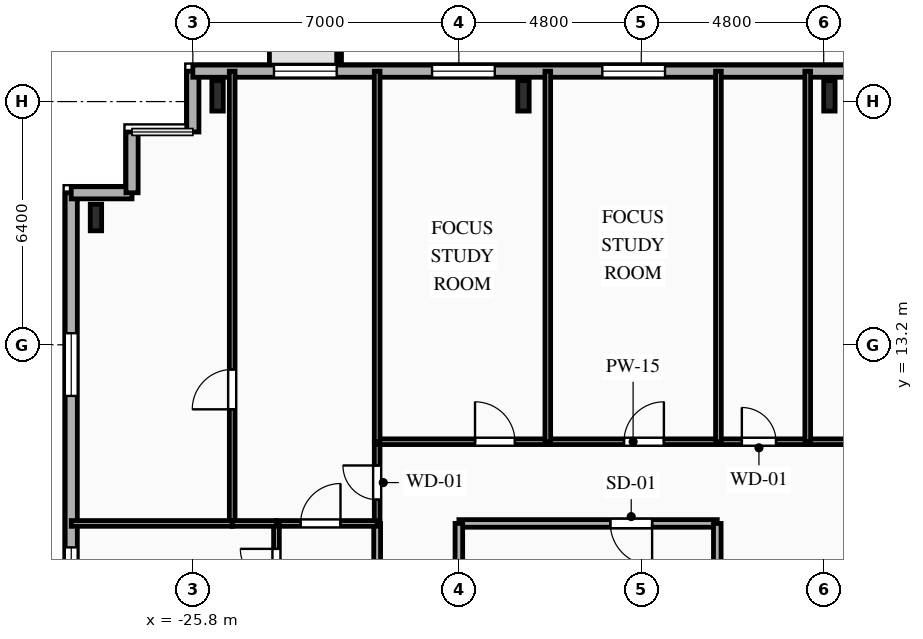
"""IFC4 building model, lengths in metres.
Left out: names, types, materials, properties, quantities, classifications, styles, units other than length and angle.
Written with IfcOpenShell. Run it as: python <this file> out.ifc"""

import sys

from ifc_helpers import new_model, si_unit, direction, frame, frame_2d, origin, origin_2d, place, context, subcontext, project, spatial, rectangle, i_section, extrude, element, fill, save


model = new_model("IFC4")
c1 = context("Model", 3, precision=1e-05, world=origin(), true_north=direction((0.0, 1.0)))
c2 = subcontext(c1, "Body", "Model", "MODEL_VIEW")
j1 = project(units=[si_unit("LENGTHUNIT", "METRE"), si_unit("PLANEANGLEUNIT", "RADIAN")], contexts=[c1])
p1 = place(None, origin())
s1 = spatial("IfcSite", under=j1, at=p1, CompositionType="ELEMENT")
p2 = place(p1, origin())
s2 = spatial("IfcBuilding", under=s1, at=p2, CompositionType="ELEMENT")
p3 = place(p2, frame((0.0, 0.0, 164.5)))
s3 = spatial("IfcBuildingStorey", under=s2, at=p3, CompositionType="ELEMENT", Elevation=164.5)
for number, where, z_axis, x_axis in (
    (1, (-9.05, 19.75, 0.0), (0.0, 0.0, 1.0), (1.0, 0.0, 0.0)),
    (2, (-17.1, 19.75, 0.0), (0.0, 0.0, 1.0), (1.0, 0.0, 0.0)),
    (3, (-25.15, 19.75, 0.0), (0.0, 0.0, 1.0), (1.0, 0.0, 0.0)),
):
    element("IfcColumn", number, at=place(p3, frame(where, z_axis=z_axis, x_axis=x_axis)), inside=s3, PredefinedType="COLUMN", context=c2, shape_type="SweptSolid", body=[
        extrude(i_section(OverallWidth=0.3, OverallDepth=0.8, WebThickness=0.018, FlangeThickness=0.033, FilletRadius=0.03, at=origin_2d()), origin(), (0.0, 0.0, 1.0), 3.35),
    ])
p4 = place(p3, frame((-28.35, 16.55, 0.0), z_axis=(0.0, 0.0, 1.0), x_axis=(1.0, 0.0, 0.0)))
e4 = element("IfcColumn", 4, at=p4, inside=s3, PredefinedType="COLUMN", context=c2, shape_type="SweptSolid", body=[
    extrude(i_section(OverallWidth=0.3, OverallDepth=0.7, WebThickness=0.017, FlangeThickness=0.032, FilletRadius=0.027, at=origin_2d()), origin(), (0.0, 0.0, 1.0), 3.35),
])
p5 = place(p3, frame((-29.0, -12.4, 0.0), z_axis=(0.0, 0.0, 1.0), x_axis=(0.0, 1.0, 0.0)))
e5 = element("IfcWall", 5, at=p5, inside=s3, PredefinedType="SOLIDWALL", context=c2, shape_type="SweptSolid", body=[
    extrude(rectangle(XDim=29.6, YDim=0.32, at=frame_2d((14.8, 0.0))), origin(), (0.0, 0.0, 1.0), 3.04),
])
p6 = place(p5, frame((2.855, 0.0, 0.85)))
e6 = element("IfcOpeningElement", 6, at=p6, cuts=e5, PredefinedType="OPENING", context=c2, shape_type="SweptSolid", body=[
    extrude(rectangle(XDim=1.65, YDim=1.85, at=frame_2d((0.825, 0.925))), frame((0.0, 0.17, 0.0), z_axis=(0.0, -1.0, 0.0), x_axis=(1.0, 0.0, 0.0)), (0.0, 0.0, 1.0), 0.34),
])
p7 = place(p5, frame((9.865, 0.0, 0.85)))
e7 = element("IfcOpeningElement", 7, at=p7, cuts=e5, PredefinedType="OPENING", context=c2, shape_type="SweptSolid", body=[
    extrude(rectangle(XDim=1.95, YDim=1.85, at=frame_2d((0.975, 0.925))), frame((0.0, 0.17, 0.0), z_axis=(0.0, -1.0, 0.0), x_axis=(1.0, 0.0, 0.0)), (0.0, 0.0, 1.0), 0.34),
])
p8 = place(p5, frame((13.13, 0.0, 0.85)))
e8 = element("IfcOpeningElement", 8, at=p8, cuts=e5, PredefinedType="OPENING", context=c2, shape_type="SweptSolid", body=[
    extrude(rectangle(XDim=1.5, YDim=1.85, at=frame_2d((0.75, 0.925))), frame((0.0, 0.17, 0.0), z_axis=(0.0, -1.0, 0.0), x_axis=(1.0, 0.0, 0.0)), (0.0, 0.0, 1.0), 0.34),
])
p9 = place(p5, frame((15.93, 0.0, 0.85)))
e9 = element("IfcOpeningElement", 9, at=p9, cuts=e5, PredefinedType="OPENING", context=c2, shape_type="SweptSolid", body=[
    extrude(rectangle(XDim=1.5, YDim=1.85, at=frame_2d((0.75, 0.925))), frame((0.0, 0.17, 0.0), z_axis=(0.0, -1.0, 0.0), x_axis=(1.0, 0.0, 0.0)), (0.0, 0.0, 1.0), 0.34),
])
p10 = place(p5, frame((18.77, 0.0, 0.85)))
e10 = element("IfcOpeningElement", 10, at=p10, cuts=e5, PredefinedType="OPENING", context=c2, shape_type="SweptSolid", body=[
    extrude(rectangle(XDim=1.5, YDim=1.85, at=frame_2d((0.75, 0.925))), frame((0.0, 0.17, 0.0), z_axis=(0.0, -1.0, 0.0), x_axis=(1.0, 0.0, 0.0)), (0.0, 0.0, 1.0), 0.34),
])
p11 = place(p5, frame((24.255, 0.0, 0.85)))
e11 = element("IfcOpeningElement", 11, at=p11, cuts=e5, PredefinedType="OPENING", context=c2, shape_type="SweptSolid", body=[
    extrude(rectangle(XDim=1.65, YDim=1.85, at=frame_2d((0.825, 0.925))), frame((0.0, 0.17, 0.0), z_axis=(0.0, -1.0, 0.0), x_axis=(1.0, 0.0, 0.0)), (0.0, 0.0, 1.0), 0.34),
])
for number, where, z_axis, x_axis in (
    (12, (-29.0, 17.2, 0.0), (0.0, 0.0, 1.0), (1.0, 0.0, 0.0)),
    (13, (-27.4, 17.2, 0.0), (0.0, 0.0, 1.0), (0.0, 1.0, 0.0)),
):
    element("IfcWall", number, at=place(p3, frame(where, z_axis=z_axis, x_axis=x_axis)), inside=s3, PredefinedType="SOLIDWALL", context=c2, shape_type="SweptSolid", body=[
        extrude(rectangle(XDim=1.6, YDim=0.32, at=frame_2d((0.8, 0.0))), origin(), (0.0, 0.0, 1.0), 3.04),
    ])
p12 = place(p3, frame((-25.8, 18.8, 0.0), z_axis=(0.0, 0.0, 1.0), x_axis=(0.0, 1.0, 0.0)))
e14 = element("IfcWall", 14, at=p12, inside=s3, PredefinedType="SOLIDWALL", context=c2, shape_type="SweptSolid", body=[
    extrude(rectangle(XDim=1.6, YDim=0.32, at=frame_2d((0.8, 0.0))), origin(), (0.0, 0.0, 1.0), 3.04),
])
p13 = place(p3, frame((-25.8, 20.4, 0.0), z_axis=(0.0, 0.0, 1.0), x_axis=(1.0, 0.0, 0.0)))
e15 = element("IfcWall", 15, at=p13, inside=s3, PredefinedType="SOLIDWALL", context=c2, shape_type="SweptSolid", body=[
    extrude(rectangle(XDim=49.6, YDim=0.32, at=frame_2d((24.8, 0.0))), origin(), (0.0, 0.0, 1.0), 3.04),
])
p14 = place(p13, frame((2.135, 0.0, 0.85)))
e16 = element("IfcOpeningElement", 16, at=p14, cuts=e15, PredefinedType="OPENING", context=c2, shape_type="SweptSolid", body=[
    extrude(rectangle(XDim=1.65, YDim=1.85, at=frame_2d((0.825, 0.925))), frame((0.0, 0.17, 0.0), z_axis=(0.0, -1.0, 0.0), x_axis=(1.0, 0.0, 0.0)), (0.0, 0.0, 1.0), 0.34),
])
p15 = place(p13, frame((6.295, 0.0, 0.85)))
e17 = element("IfcOpeningElement", 17, at=p15, cuts=e15, PredefinedType="OPENING", context=c2, shape_type="SweptSolid", body=[
    extrude(rectangle(XDim=1.65, YDim=1.85, at=frame_2d((0.825, 0.925))), frame((0.0, 0.17, 0.0), z_axis=(0.0, -1.0, 0.0), x_axis=(1.0, 0.0, 0.0)), (0.0, 0.0, 1.0), 0.34),
])
p16 = place(p13, frame((10.775, 0.0, 0.85)))
e18 = element("IfcOpeningElement", 18, at=p16, cuts=e15, PredefinedType="OPENING", context=c2, shape_type="SweptSolid", body=[
    extrude(rectangle(XDim=1.65, YDim=1.85, at=frame_2d((0.825, 0.925))), frame((0.0, 0.17, 0.0), z_axis=(0.0, -1.0, 0.0), x_axis=(1.0, 0.0, 0.0)), (0.0, 0.0, 1.0), 0.34),
])
p17 = place(p13, frame((18.49, 0.0, 0.85)))
e19 = element("IfcOpeningElement", 19, at=p17, cuts=e15, PredefinedType="OPENING", context=c2, shape_type="SweptSolid", body=[
    extrude(rectangle(XDim=1.5, YDim=1.85, at=frame_2d((0.75, 0.925))), frame((0.0, 0.17, 0.0), z_axis=(0.0, -1.0, 0.0), x_axis=(1.0, 0.0, 0.0)), (0.0, 0.0, 1.0), 0.34),
])
p18 = place(p13, frame((25.34, 0.0, 0.85)))
e20 = element("IfcOpeningElement", 20, at=p18, cuts=e15, PredefinedType="OPENING", context=c2, shape_type="SweptSolid", body=[
    extrude(rectangle(XDim=2.2, YDim=1.85, at=frame_2d((1.1, 0.925))), frame((0.0, 0.17, 0.0), z_axis=(0.0, -1.0, 0.0), x_axis=(1.0, 0.0, 0.0)), (0.0, 0.0, 1.0), 0.34),
])
p19 = place(p13, frame((33.74, 0.0, 0.85)))
e21 = element("IfcOpeningElement", 21, at=p19, cuts=e15, PredefinedType="OPENING", context=c2, shape_type="SweptSolid", body=[
    extrude(rectangle(XDim=2.2, YDim=1.85, at=frame_2d((1.1, 0.925))), frame((0.0, 0.17, 0.0), z_axis=(0.0, -1.0, 0.0), x_axis=(1.0, 0.0, 0.0)), (0.0, 0.0, 1.0), 0.34),
])
p20 = place(p13, frame((42.095, 0.0, 0.85)))
e22 = element("IfcOpeningElement", 22, at=p20, cuts=e15, PredefinedType="OPENING", context=c2, shape_type="SweptSolid", body=[
    extrude(rectangle(XDim=1.65, YDim=1.85, at=frame_2d((0.825, 0.925))), frame((0.0, 0.17, 0.0), z_axis=(0.0, -1.0, 0.0), x_axis=(1.0, 0.0, 0.0)), (0.0, 0.0, 1.0), 0.34),
])
p21 = place(p13, frame((47.45, 0.0, 0.85)))
e23 = element("IfcOpeningElement", 23, at=p21, cuts=e15, PredefinedType="OPENING", context=c2, shape_type="SweptSolid", body=[
    extrude(rectangle(XDim=1.1, YDim=1.85, at=frame_2d((0.55, 0.925))), frame((0.0, 0.17, 0.0), z_axis=(0.0, -1.0, 0.0), x_axis=(1.0, 0.0, 0.0)), (0.0, 0.0, 1.0), 0.34),
])
p22 = place(p3, frame((-12.0, 8.5, 0.0), z_axis=(0.0, 0.0, 1.0), x_axis=(-1.0, 0.0, 0.0)))
e24 = element("IfcWall", 24, at=p22, inside=s3, PredefinedType="PARTITIONING", context=c2, shape_type="SweptSolid", body=[
    extrude(rectangle(XDim=6.8, YDim=0.2, at=frame_2d((3.4, 0.0))), origin(), (0.0, 0.0, 1.0), 3.04),
])
p23 = place(p22, frame((1.715, 0.0, 0.0)))
e25 = element("IfcOpeningElement", 25, at=p23, cuts=e24, PredefinedType="OPENING", context=c2, shape_type="SweptSolid", body=[
    extrude(rectangle(XDim=1.1, YDim=2.15, at=frame_2d((0.55, 1.075))), frame((0.0, 0.11, 0.0), z_axis=(0.0, -1.0, 0.0), x_axis=(1.0, 0.0, 0.0)), (0.0, 0.0, 1.0), 0.22),
])
p24 = place(p3, frame((-18.8, 8.5, 0.0), z_axis=(0.0, 0.0, 1.0), x_axis=(0.0, -1.0, 0.0)))
e26 = element("IfcWall", 26, at=p24, inside=s3, PredefinedType="PARTITIONING", context=c2, shape_type="SweptSolid", body=[
    extrude(rectangle(XDim=2.9, YDim=0.2, at=frame_2d((1.45, 0.0))), origin(), (0.0, 0.0, 1.0), 2.525),
])
p25 = place(p3, frame((-12.0, 5.6, 0.0), z_axis=(0.0, 0.0, 1.0), x_axis=(0.0, 1.0, 0.0)))
e27 = element("IfcWall", 27, at=p25, inside=s3, PredefinedType="PARTITIONING", context=c2, shape_type="SweptSolid", body=[
    extrude(rectangle(XDim=2.9, YDim=0.2, at=frame_2d((1.45, 0.0))), origin(), (0.0, 0.0, 1.0), 3.04),
])
p26 = place(p3, frame((-20.95, 8.5, 0.0), z_axis=(0.0, 0.0, 1.0), x_axis=(0.0, 1.0, 0.0)))
e28 = element("IfcWall", 28, at=p26, inside=s3, PredefinedType="PARTITIONING", context=c2, shape_type="SweptSolid", body=[
    extrude(rectangle(XDim=2.15, YDim=0.15, at=frame_2d((1.075, 0.0))), origin(), (0.0, 0.0, 1.0), 3.04),
])
p27 = place(p26, frame((0.625, 0.0, 0.0)))
e29 = element("IfcOpeningElement", 29, at=p27, cuts=e28, PredefinedType="OPENING", context=c2, shape_type="SweptSolid", body=[
    extrude(rectangle(XDim=0.9, YDim=2.1, at=frame_2d((0.45, 1.05))), frame((0.0, 0.085, 0.0), z_axis=(0.0, -1.0, 0.0), x_axis=(1.0, 0.0, 0.0)), (0.0, 0.0, 1.0), 0.17),
])
p28 = place(p3, frame((-20.95, 10.65, 0.0), z_axis=(0.0, 0.0, 1.0), x_axis=(1.0, 0.0, 0.0)))
e30 = element("IfcWall", 30, at=p28, inside=s3, PredefinedType="PARTITIONING", context=c2, shape_type="SweptSolid", body=[
    extrude(rectangle(XDim=4.49, YDim=0.15, at=frame_2d((2.245, 0.0))), origin(), (0.0, 0.0, 1.0), 3.04),
])
p29 = place(p28, frame((2.575, 0.0, 0.0)))
e31 = element("IfcOpeningElement", 31, at=p29, cuts=e30, PredefinedType="OPENING", context=c2, shape_type="SweptSolid", body=[
    extrude(rectangle(XDim=1.05, YDim=2.15, at=frame_2d((0.525, 1.075))), frame((0.0, 0.085, 0.0), z_axis=(0.0, -1.0, 0.0), x_axis=(1.0, 0.0, 0.0)), (0.0, 0.0, 1.0), 0.17),
])
p30 = place(p3, frame((-16.46, 10.65, 0.0), z_axis=(0.0, 0.0, 1.0), x_axis=(1.0, 0.0, 0.0)))
e32 = element("IfcWall", 32, at=p30, inside=s3, PredefinedType="PARTITIONING", context=c2, shape_type="SweptSolid", body=[
    extrude(rectangle(XDim=4.49, YDim=0.15, at=frame_2d((2.245, 0.0))), origin(), (0.0, 0.0, 1.0), 3.04),
])
p31 = place(p30, frame((2.005, 0.0, 0.0)))
e33 = element("IfcOpeningElement", 33, at=p31, cuts=e32, PredefinedType="OPENING", context=c2, shape_type="SweptSolid", body=[
    extrude(rectangle(XDim=1.05, YDim=2.15, at=frame_2d((0.525, 1.075))), frame((0.0, 0.085, 0.0), z_axis=(0.0, -1.0, 0.0), x_axis=(1.0, 0.0, 0.0)), (0.0, 0.0, 1.0), 0.17),
])
p32 = place(p3, frame((-11.97, 10.65, 0.0), z_axis=(0.0, 0.0, 1.0), x_axis=(1.0, 0.0, 0.0)))
e34 = element("IfcWall", 34, at=p32, inside=s3, PredefinedType="PLUMBINGWALL", context=c2, shape_type="SweptSolid", body=[
    extrude(rectangle(XDim=2.35, YDim=0.15, at=frame_2d((1.175, 0.0))), origin(), (0.0, 0.0, 1.0), 3.04),
])
p33 = place(p32, frame((0.616, 0.0, 0.0)))
e35 = element("IfcOpeningElement", 35, at=p33, cuts=e34, PredefinedType="OPENING", context=c2, shape_type="SweptSolid", body=[
    extrude(rectangle(XDim=0.9, YDim=2.1, at=frame_2d((0.45, 1.05))), frame((0.0, 0.085, 0.0), z_axis=(0.0, -1.0, 0.0), x_axis=(1.0, 0.0, 0.0)), (0.0, 0.0, 1.0), 0.17),
])
p34 = place(p3, frame((-9.62, 10.65, 0.0), z_axis=(0.0, 0.0, 1.0), x_axis=(1.0, 0.0, 0.0)))
e36 = element("IfcWall", 36, at=p34, inside=s3, PredefinedType="PARTITIONING", context=c2, shape_type="SweptSolid", body=[
    extrude(rectangle(XDim=6.03, YDim=0.15, at=frame_2d((3.015, 0.0))), origin(), (0.0, 0.0, 1.0), 3.04),
])
p35 = place(p34, frame((4.01, 0.0, 0.0)))
e37 = element("IfcOpeningElement", 37, at=p35, cuts=e36, PredefinedType="OPENING", context=c2, shape_type="SweptSolid", body=[
    extrude(rectangle(XDim=0.95, YDim=2.1, at=frame_2d((0.475, 1.05))), frame((0.0, 0.085, 0.0), z_axis=(0.0, -1.0, 0.0), x_axis=(1.0, 0.0, 0.0)), (0.0, 0.0, 1.0), 0.17),
])
p36 = place(p3, frame((-20.95, -5.6, 0.0), z_axis=(0.0, 0.0, 1.0), x_axis=(0.0, 1.0, 0.0)))
e38 = element("IfcWall", 38, at=p36, inside=s3, PredefinedType="PARTITIONING", context=c2, shape_type="SweptSolid", body=[
    extrude(rectangle(XDim=14.1, YDim=0.18, at=frame_2d((7.05, 0.0))), origin(), (0.0, 0.0, 1.0), 3.04),
])
p37 = place(p36, frame((5.058, 0.0, 0.0)))
e39 = element("IfcOpeningElement", 39, at=p37, cuts=e38, PredefinedType="OPENING", context=c2, shape_type="SweptSolid", body=[
    extrude(rectangle(XDim=1.0, YDim=2.15, at=frame_2d((0.5, 1.075))), frame((0.0, 0.1, 0.0), z_axis=(0.0, -1.0, 0.0), x_axis=(1.0, 0.0, 0.0)), (0.0, 0.0, 1.0), 0.2),
])
p38 = place(p3, frame((-23.6, 8.5, 0.0), z_axis=(0.0, 0.0, 1.0), x_axis=(1.0, 0.0, 0.0)))
e40 = element("IfcWall", 40, at=p38, inside=s3, PredefinedType="PARTITIONING", context=c2, shape_type="SweptSolid", body=[
    extrude(rectangle(XDim=2.65, YDim=0.15, at=frame_2d((1.325, 0.0))), origin(), (0.0, 0.0, 1.0), 3.04),
])
p39 = place(p38, frame((0.635, 0.0, 0.0)))
e41 = element("IfcOpeningElement", 41, at=p39, cuts=e40, PredefinedType="OPENING", context=c2, shape_type="SweptSolid", body=[
    extrude(rectangle(XDim=1.05, YDim=2.15, at=frame_2d((0.525, 1.075))), frame((0.0, 0.085, 0.0), z_axis=(0.0, -1.0, 0.0), x_axis=(1.0, 0.0, 0.0)), (0.0, 0.0, 1.0), 0.17),
])
p40 = place(p3, frame((-23.6, 5.68, 0.0), z_axis=(0.0, 0.0, 1.0), x_axis=(0.0, 1.0, 0.0)))
e42 = element("IfcWall", 42, at=p40, inside=s3, PredefinedType="PARTITIONING", context=c2, shape_type="SweptSolid", body=[
    extrude(rectangle(XDim=2.82, YDim=0.15, at=frame_2d((1.41, 0.0))), origin(), (0.0, 0.0, 1.0), 2.695),
])
p41 = place(p40, frame((1.201, 0.0, 0.0)))
e43 = element("IfcOpeningElement", 43, at=p41, cuts=e42, PredefinedType="OPENING", context=c2, shape_type="SweptSolid", body=[
    extrude(rectangle(XDim=0.95, YDim=2.1, at=frame_2d((0.475, 1.05))), frame((0.0, 0.085, 0.0), z_axis=(0.0, -1.0, 0.0), x_axis=(1.0, 0.0, 0.0)), (0.0, 0.0, 1.0), 0.17),
])
p42 = place(p3, frame((-24.765, 8.5, 0.0), z_axis=(0.0, 0.0, 1.0), x_axis=(0.0, 1.0, 0.0)))
e44 = element("IfcWall", 44, at=p42, inside=s3, PredefinedType="PARTITIONING", context=c2, shape_type="SweptSolid", body=[
    extrude(rectangle(XDim=11.9, YDim=0.15, at=frame_2d((5.95, 0.0))), origin(), (0.0, 0.0, 1.0), 3.04),
])
p43 = place(p42, frame((3.002, 0.0, 0.0)))
e45 = element("IfcOpeningElement", 45, at=p43, cuts=e44, PredefinedType="OPENING", context=c2, shape_type="SweptSolid", body=[
    extrude(rectangle(XDim=1.05, YDim=2.15, at=frame_2d((0.525, 1.075))), frame((0.0, 0.085, 0.0), z_axis=(0.0, -1.0, 0.0), x_axis=(1.0, 0.0, 0.0)), (0.0, 0.0, 1.0), 0.17),
])
p44 = place(p3, frame((-23.6, 8.5, 0.0), z_axis=(0.0, 0.0, 1.0), x_axis=(-1.0, 0.0, 0.0)))
e46 = element("IfcWall", 46, at=p44, inside=s3, PredefinedType="PARTITIONING", context=c2, shape_type="SweptSolid", body=[
    extrude(rectangle(XDim=1.165, YDim=0.15, at=frame_2d((0.583, 0.0))), origin(), (0.0, 0.0, 1.0), 3.04),
])
p45 = place(p3, frame((-20.95, 20.4, 0.0), z_axis=(0.0, 0.0, 1.0), x_axis=(0.0, -1.0, 0.0)))
e47 = element("IfcWall", 47, at=p45, inside=s3, PredefinedType="PARTITIONING", context=c2, shape_type="SweptSolid", body=[
    extrude(rectangle(XDim=9.75, YDim=0.15, at=frame_2d((4.875, 0.0))), origin(), (0.0, 0.0, 1.0), 3.04),
])
p46 = place(p3, frame((-24.765, 8.5, 0.0), z_axis=(0.0, 0.0, 1.0), x_axis=(-1.0, 0.0, 0.0)))
e48 = element("IfcWall", 48, at=p46, inside=s3, PredefinedType="PARTITIONING", context=c2, shape_type="SweptSolid", body=[
    extrude(rectangle(XDim=4.235, YDim=0.15, at=frame_2d((2.118, 0.0))), origin(), (0.0, 0.0, 1.0), 3.04),
])
p47 = place(p3, frame((-16.46, 20.4, 0.0), z_axis=(0.0, 0.0, 1.0), x_axis=(0.0, -1.0, 0.0)))
e49 = element("IfcWall", 49, at=p47, inside=s3, PredefinedType="PARTITIONING", context=c2, shape_type="SweptSolid", body=[
    extrude(rectangle(XDim=9.75, YDim=0.15, at=frame_2d((4.875, 0.0))), origin(), (0.0, 0.0, 1.0), 3.04),
])
for number, where, z_axis, x_axis in (
    (50, (-11.97, 20.4, 0.0), (0.0, 0.0, 1.0), (0.0, -1.0, 0.0)),
    (51, (-9.62, 20.4, 0.0), (0.0, 0.0, 1.0), (0.0, -1.0, 0.0)),
):
    element("IfcWall", number, at=place(p3, frame(where, z_axis=z_axis, x_axis=x_axis)), inside=s3, PredefinedType="PLUMBINGWALL", context=c2, shape_type="SweptSolid", body=[
        extrude(rectangle(XDim=9.75, YDim=0.15, at=frame_2d((4.875, 0.0))), origin(), (0.0, 0.0, 1.0), 3.04),
    ])
p48 = place(p10, origin())
e52 = element("IfcWindow", 52, at=p48, inside=s3, PartitioningType="SINGLE_PANEL", PredefinedType="WINDOW", context=c2, shape_type="SweptSolid", body=[
    extrude(rectangle(XDim=1.5, YDim=1.85, at=frame_2d((0.75, 0.925))), frame((0.0, 0.03, 0.0), z_axis=(0.0, -1.0, 0.0), x_axis=(1.0, 0.0, 0.0)), (0.0, 0.0, 1.0), 0.06),
])
fill(e10, e52)
p49 = place(p11, origin())
e53 = element("IfcWindow", 53, at=p49, inside=s3, PartitioningType="SINGLE_PANEL", PredefinedType="WINDOW", context=c2, shape_type="SweptSolid", body=[
    extrude(rectangle(XDim=1.65, YDim=1.85, at=frame_2d((0.825, 0.925))), frame((0.0, 0.03, 0.0), z_axis=(0.0, -1.0, 0.0), x_axis=(1.0, 0.0, 0.0)), (0.0, 0.0, 1.0), 0.06),
])
fill(e11, e53)
p50 = place(p14, origin())
e54 = element("IfcWindow", 54, at=p50, inside=s3, PartitioningType="SINGLE_PANEL", PredefinedType="WINDOW", context=c2, shape_type="SweptSolid", body=[
    extrude(rectangle(XDim=1.65, YDim=1.85, at=frame_2d((0.825, 0.925))), frame((0.0, 0.03, 0.0), z_axis=(0.0, -1.0, 0.0), x_axis=(1.0, 0.0, 0.0)), (0.0, 0.0, 1.0), 0.06),
])
fill(e16, e54)
p51 = place(p15, origin())
e55 = element("IfcWindow", 55, at=p51, inside=s3, PartitioningType="SINGLE_PANEL", PredefinedType="WINDOW", context=c2, shape_type="SweptSolid", body=[
    extrude(rectangle(XDim=1.65, YDim=1.85, at=frame_2d((0.825, 0.925))), frame((0.0, 0.03, 0.0), z_axis=(0.0, -1.0, 0.0), x_axis=(1.0, 0.0, 0.0)), (0.0, 0.0, 1.0), 0.06),
])
fill(e17, e55)
p52 = place(p16, origin())
e56 = element("IfcWindow", 56, at=p52, inside=s3, PartitioningType="SINGLE_PANEL", PredefinedType="WINDOW", context=c2, shape_type="SweptSolid", body=[
    extrude(rectangle(XDim=1.65, YDim=1.85, at=frame_2d((0.825, 0.925))), frame((0.0, 0.03, 0.0), z_axis=(0.0, -1.0, 0.0), x_axis=(1.0, 0.0, 0.0)), (0.0, 0.0, 1.0), 0.06),
])
fill(e18, e56)
p53 = place(p23, origin())
e57 = element("IfcDoor", 57, at=p53, inside=s3, OperationType="SINGLE_SWING_LEFT", PredefinedType="DOOR", context=c2, shape_type="SweptSolid", body=[
    extrude(rectangle(XDim=1.1, YDim=2.15, at=frame_2d((0.55, 1.075))), frame((0.0, 0.025, 0.0), z_axis=(0.0, -1.0, 0.0), x_axis=(1.0, 0.0, 0.0)), (0.0, 0.0, 1.0), 0.05),
])
fill(e25, e57)
p54 = place(p27, origin())
e58 = element("IfcDoor", 58, at=p54, inside=s3, OperationType="SINGLE_SWING_RIGHT", PredefinedType="DOOR", context=c2, shape_type="SweptSolid", body=[
    extrude(rectangle(XDim=0.9, YDim=2.1, at=frame_2d((0.45, 1.05))), frame((0.0, 0.025, 0.0), z_axis=(0.0, -1.0, 0.0), x_axis=(1.0, 0.0, 0.0)), (0.0, 0.0, 1.0), 0.05),
])
fill(e29, e58)
p55 = place(p29, origin())
e59 = element("IfcDoor", 59, at=p55, inside=s3, OperationType="SINGLE_SWING_LEFT", PredefinedType="DOOR", context=c2, shape_type="SweptSolid", body=[
    extrude(rectangle(XDim=1.05, YDim=2.15, at=frame_2d((0.525, 1.075))), frame((0.0, 0.025, 0.0), z_axis=(0.0, -1.0, 0.0), x_axis=(1.0, 0.0, 0.0)), (0.0, 0.0, 1.0), 0.05),
])
fill(e31, e59)
p56 = place(p31, origin())
e60 = element("IfcDoor", 60, at=p56, inside=s3, OperationType="SINGLE_SWING_RIGHT", PredefinedType="DOOR", context=c2, shape_type="SweptSolid", body=[
    extrude(rectangle(XDim=1.05, YDim=2.15, at=frame_2d((0.525, 1.075))), frame((0.0, 0.025, 0.0), z_axis=(0.0, -1.0, 0.0), x_axis=(1.0, 0.0, 0.0)), (0.0, 0.0, 1.0), 0.05),
])
fill(e33, e60)
p57 = place(p33, origin())
e61 = element("IfcDoor", 61, at=p57, inside=s3, OperationType="SINGLE_SWING_LEFT", PredefinedType="DOOR", context=c2, shape_type="SweptSolid", body=[
    extrude(rectangle(XDim=0.9, YDim=2.1, at=frame_2d((0.45, 1.05))), frame((0.0, 0.025, 0.0), z_axis=(0.0, -1.0, 0.0), x_axis=(1.0, 0.0, 0.0)), (0.0, 0.0, 1.0), 0.05),
])
fill(e35, e61)
p58 = place(p39, origin())
e62 = element("IfcDoor", 62, at=p58, inside=s3, OperationType="SINGLE_SWING_RIGHT", PredefinedType="DOOR", context=c2, shape_type="SweptSolid", body=[
    extrude(rectangle(XDim=1.05, YDim=2.15, at=frame_2d((0.525, 1.075))), frame((0.0, 0.025, 0.0), z_axis=(0.0, -1.0, 0.0), x_axis=(1.0, 0.0, 0.0)), (0.0, 0.0, 1.0), 0.05),
])
fill(e41, e62)
p59 = place(p41, origin())
e63 = element("IfcDoor", 63, at=p59, inside=s3, OperationType="SINGLE_SWING_RIGHT", PredefinedType="DOOR", context=c2, shape_type="SweptSolid", body=[
    extrude(rectangle(XDim=0.95, YDim=2.1, at=frame_2d((0.475, 1.05))), frame((0.0, 0.025, 0.0), z_axis=(0.0, -1.0, 0.0), x_axis=(1.0, 0.0, 0.0)), (0.0, 0.0, 1.0), 0.05),
])
fill(e43, e63)
p60 = place(p43, origin())
e64 = element("IfcDoor", 64, at=p60, inside=s3, OperationType="SINGLE_SWING_LEFT", PredefinedType="DOOR", context=c2, shape_type="SweptSolid", body=[
    extrude(rectangle(XDim=1.05, YDim=2.15, at=frame_2d((0.525, 1.075))), frame((0.0, 0.025, 0.0), z_axis=(0.0, -1.0, 0.0), x_axis=(1.0, 0.0, 0.0)), (0.0, 0.0, 1.0), 0.05),
])
fill(e45, e64)
save(model, sys.argv[1])
